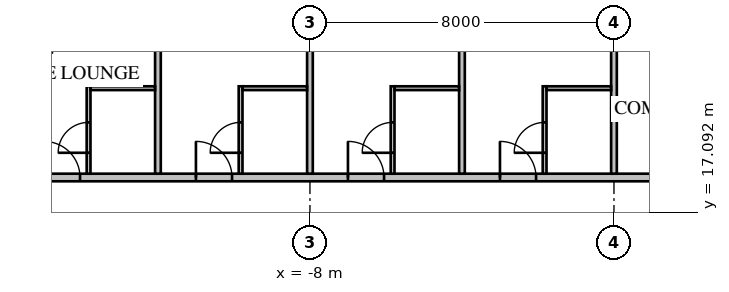
"""IFC4 building model, lengths in metres.
Left out: names, types, materials, properties, quantities, classifications, styles, units other than length and angle.
Written with IfcOpenShell. Run it as: python <this file> out.ifc"""

import sys

from ifc_helpers import new_model, si_unit, direction, frame, frame_2d, origin, place, context, subcontext, project, spatial, rectangle, extrude, element, fill, save


model = new_model("IFC4")
c1 = context("Model", 3, precision=1e-05, world=origin(), true_north=direction((0.0, 1.0)))
c2 = subcontext(c1, "Body", "Model", "MODEL_VIEW")
j1 = project(units=[si_unit("LENGTHUNIT", "METRE"), si_unit("PLANEANGLEUNIT", "RADIAN")], contexts=[c1])
p1 = place(None, origin())
s1 = spatial("IfcSite", under=j1, at=p1, CompositionType="ELEMENT")
p2 = place(p1, origin())
s2 = spatial("IfcBuilding", under=s1, at=p2, CompositionType="ELEMENT")
p3 = place(p2, frame((0.0, 0.0, 16.0)))
s3 = spatial("IfcBuildingStorey", under=s2, at=p3, CompositionType="ELEMENT", Elevation=16.0)
p4 = place(p3, frame((18.0, 18.0, 0.0), z_axis=(0.0, 0.0, 1.0), x_axis=(-1.0, 0.0, 0.0)))
e1 = element("IfcWall", 1, at=p4, inside=s3, PredefinedType="PARTITIONING", context=c2, shape_type="SweptSolid", body=[
    extrude(rectangle(XDim=36.0, YDim=0.2, at=frame_2d((18.0, 0.0))), origin(), (0.0, 0.0, 1.0), 3.65),
])
p5 = place(p4, frame((0.375, 0.0, 0.0)))
e2 = element("IfcOpeningElement", 2, at=p5, cuts=e1, PredefinedType="OPENING", context=c2, shape_type="SweptSolid", body=[
    extrude(rectangle(XDim=1.0, YDim=2.1, at=frame_2d((0.5, 1.05))), frame((0.0, 0.12, 0.0), z_axis=(0.0, -1.0, 0.0), x_axis=(1.0, 0.0, 0.0)), (0.0, 0.0, 1.0), 0.24),
])
p6 = place(p4, frame((4.05, 0.0, 0.0)))
e3 = element("IfcOpeningElement", 3, at=p6, cuts=e1, PredefinedType="OPENING", context=c2, shape_type="SweptSolid", body=[
    extrude(rectangle(XDim=0.95, YDim=2.1, at=frame_2d((0.475, 1.05))), frame((0.0, 0.12, 0.0), z_axis=(0.0, -1.0, 0.0), x_axis=(1.0, 0.0, 0.0)), (0.0, 0.0, 1.0), 0.24),
])
p7 = place(p4, frame((8.05, 0.0, 0.0)))
e4 = element("IfcOpeningElement", 4, at=p7, cuts=e1, PredefinedType="OPENING", context=c2, shape_type="SweptSolid", body=[
    extrude(rectangle(XDim=0.95, YDim=2.1, at=frame_2d((0.475, 1.05))), frame((0.0, 0.12, 0.0), z_axis=(0.0, -1.0, 0.0), x_axis=(1.0, 0.0, 0.0)), (0.0, 0.0, 1.0), 0.24),
])
p8 = place(p4, frame((20.05, 0.0, 0.0)))
e5 = element("IfcOpeningElement", 5, at=p8, cuts=e1, PredefinedType="OPENING", context=c2, shape_type="SweptSolid", body=[
    extrude(rectangle(XDim=0.95, YDim=2.1, at=frame_2d((0.475, 1.05))), frame((0.0, 0.12, 0.0), z_axis=(0.0, -1.0, 0.0), x_axis=(1.0, 0.0, 0.0)), (0.0, 0.0, 1.0), 0.24),
])
p9 = place(p4, frame((24.05, 0.0, 0.0)))
e6 = element("IfcOpeningElement", 6, at=p9, cuts=e1, PredefinedType="OPENING", context=c2, shape_type="SweptSolid", body=[
    extrude(rectangle(XDim=0.95, YDim=2.1, at=frame_2d((0.475, 1.05))), frame((0.0, 0.12, 0.0), z_axis=(0.0, -1.0, 0.0), x_axis=(1.0, 0.0, 0.0)), (0.0, 0.0, 1.0), 0.24),
])
p10 = place(p4, frame((28.05, 0.0, 0.0)))
e7 = element("IfcOpeningElement", 7, at=p10, cuts=e1, PredefinedType="OPENING", context=c2, shape_type="SweptSolid", body=[
    extrude(rectangle(XDim=0.95, YDim=2.1, at=frame_2d((0.475, 1.05))), frame((0.0, 0.12, 0.0), z_axis=(0.0, -1.0, 0.0), x_axis=(1.0, 0.0, 0.0)), (0.0, 0.0, 1.0), 0.24),
])
p11 = place(p4, frame((32.05, 0.0, 0.0)))
e8 = element("IfcOpeningElement", 8, at=p11, cuts=e1, PredefinedType="OPENING", context=c2, shape_type="SweptSolid", body=[
    extrude(rectangle(XDim=0.95, YDim=2.1, at=frame_2d((0.475, 1.05))), frame((0.0, 0.12, 0.0), z_axis=(0.0, -1.0, 0.0), x_axis=(1.0, 0.0, 0.0)), (0.0, 0.0, 1.0), 0.24),
])
p12 = place(p4, frame((34.375, 0.0, 0.0)))
e9 = element("IfcOpeningElement", 9, at=p12, cuts=e1, PredefinedType="OPENING", context=c2, shape_type="SweptSolid", body=[
    extrude(rectangle(XDim=0.95, YDim=2.1, at=frame_2d((0.475, 1.05))), frame((0.0, 0.12, 0.0), z_axis=(0.0, -1.0, 0.0), x_axis=(1.0, 0.0, 0.0)), (0.0, 0.0, 1.0), 0.24),
])
p13 = place(p4, frame((11.2, 0.0, 0.0)))
e10 = element("IfcOpeningElement", 10, at=p13, cuts=e1, PredefinedType="OPENING", context=c2, shape_type="SweptSolid", body=[
    extrude(rectangle(XDim=1.0, YDim=2.1, at=frame_2d((0.5, 1.05))), frame((0.0, 0.12, 0.0), z_axis=(0.0, -1.0, 0.0), x_axis=(1.0, 0.0, 0.0)), (0.0, 0.0, 1.0), 0.24),
])
p14 = place(p4, frame((15.2, 0.0, 0.0)))
e11 = element("IfcOpeningElement", 11, at=p14, cuts=e1, PredefinedType="OPENING", context=c2, shape_type="SweptSolid", body=[
    extrude(rectangle(XDim=1.0, YDim=2.1, at=frame_2d((0.5, 1.05))), frame((0.0, 0.12, 0.0), z_axis=(0.0, -1.0, 0.0), x_axis=(1.0, 0.0, 0.0)), (0.0, 0.0, 1.0), 0.24),
])
p15 = place(p3, frame((0.0, 18.1, 0.0), z_axis=(0.0, 0.0, 1.0), x_axis=(0.0, 1.0, 0.0)))
e12 = element("IfcWall", 12, at=p15, inside=s3, PredefinedType="PARTITIONING", context=c2, shape_type="SweptSolid", body=[
    extrude(rectangle(XDim=6.6, YDim=0.15, at=frame_2d((3.3, 0.0))), origin(), (0.0, 0.0, 1.0), 2.809),
])
for number, where, z_axis, x_axis in (
    (13, (-4.0, 18.1, 0.0), (0.0, 0.0, 1.0), (0.0, 1.0, 0.0)),
    (14, (-8.0, 18.1, 0.0), (0.0, 0.0, 1.0), (0.0, 1.0, 0.0)),
    (15, (-12.0, 18.1, 0.0), (0.0, 0.0, 1.0), (0.0, 1.0, 0.0)),
):
    element("IfcWall", number, at=place(p3, frame(where, z_axis=z_axis, x_axis=x_axis)), inside=s3, PredefinedType="PARTITIONING", context=c2, shape_type="SweptSolid", body=[
        extrude(rectangle(XDim=6.6, YDim=0.15, at=frame_2d((3.3, 0.0))), origin(), (0.0, 0.0, 1.0), 3.65),
    ])
p16 = place(p3, frame((-1.825, 18.1, 0.0), z_axis=(0.0, 0.0, 1.0), x_axis=(0.0, 1.0, 0.0)))
e16 = element("IfcWall", 16, at=p16, inside=s3, PredefinedType="PARTITIONING", context=c2, shape_type="SweptSolid", body=[
    extrude(rectangle(XDim=2.3, YDim=0.1, at=frame_2d((1.15, 0.0))), origin(), (0.0, 0.0, 1.0), 3.65),
])
p17 = place(p16, frame((0.55, 0.0, 0.0)))
e17 = element("IfcOpeningElement", 17, at=p17, cuts=e16, PredefinedType="OPENING", context=c2, shape_type="SweptSolid", body=[
    extrude(rectangle(XDim=0.8, YDim=2.1, at=frame_2d((0.4, 1.05))), frame((0.0, 0.07, 0.0), z_axis=(0.0, -1.0, 0.0), x_axis=(1.0, 0.0, 0.0)), (0.0, 0.0, 1.0), 0.14),
])
p18 = place(p3, frame((-0.075, 20.35, 0.0), z_axis=(0.0, 0.0, 1.0), x_axis=(-1.0, 0.0, 0.0)))
e18 = element("IfcWall", 18, at=p18, inside=s3, PredefinedType="PARTITIONING", context=c2, shape_type="SweptSolid", body=[
    extrude(rectangle(XDim=1.7, YDim=0.1, at=frame_2d((0.85, 0.0))), origin(), (0.0, 0.0, 1.0), 3.65),
])
p19 = place(p3, frame((-5.825, 18.1, 0.0), z_axis=(0.0, 0.0, 1.0), x_axis=(0.0, 1.0, 0.0)))
e19 = element("IfcWall", 19, at=p19, inside=s3, PredefinedType="PARTITIONING", context=c2, shape_type="SweptSolid", body=[
    extrude(rectangle(XDim=2.3, YDim=0.1, at=frame_2d((1.15, 0.0))), origin(), (0.0, 0.0, 1.0), 3.65),
])
p20 = place(p19, frame((0.55, 0.0, 0.0)))
e20 = element("IfcOpeningElement", 20, at=p20, cuts=e19, PredefinedType="OPENING", context=c2, shape_type="SweptSolid", body=[
    extrude(rectangle(XDim=0.8, YDim=2.1, at=frame_2d((0.4, 1.05))), frame((0.0, 0.07, 0.0), z_axis=(0.0, -1.0, 0.0), x_axis=(1.0, 0.0, 0.0)), (0.0, 0.0, 1.0), 0.14),
])
p21 = place(p3, frame((-4.075, 20.35, 0.0), z_axis=(0.0, 0.0, 1.0), x_axis=(-1.0, 0.0, 0.0)))
e21 = element("IfcWall", 21, at=p21, inside=s3, PredefinedType="PARTITIONING", context=c2, shape_type="SweptSolid", body=[
    extrude(rectangle(XDim=1.7, YDim=0.1, at=frame_2d((0.85, 0.0))), origin(), (0.0, 0.0, 1.0), 3.65),
])
p22 = place(p3, frame((-9.825, 18.1, 0.0), z_axis=(0.0, 0.0, 1.0), x_axis=(0.0, 1.0, 0.0)))
e22 = element("IfcWall", 22, at=p22, inside=s3, PredefinedType="PARTITIONING", context=c2, shape_type="SweptSolid", body=[
    extrude(rectangle(XDim=2.3, YDim=0.1, at=frame_2d((1.15, 0.0))), origin(), (0.0, 0.0, 1.0), 3.65),
])
p23 = place(p22, frame((0.55, 0.0, 0.0)))
e23 = element("IfcOpeningElement", 23, at=p23, cuts=e22, PredefinedType="OPENING", context=c2, shape_type="SweptSolid", body=[
    extrude(rectangle(XDim=0.8, YDim=2.1, at=frame_2d((0.4, 1.05))), frame((0.0, 0.07, 0.0), z_axis=(0.0, -1.0, 0.0), x_axis=(1.0, 0.0, 0.0)), (0.0, 0.0, 1.0), 0.14),
])
p24 = place(p3, frame((-8.075, 20.35, 0.0), z_axis=(0.0, 0.0, 1.0), x_axis=(-1.0, 0.0, 0.0)))
e24 = element("IfcWall", 24, at=p24, inside=s3, PredefinedType="PARTITIONING", context=c2, shape_type="SweptSolid", body=[
    extrude(rectangle(XDim=1.7, YDim=0.1, at=frame_2d((0.85, 0.0))), origin(), (0.0, 0.0, 1.0), 3.65),
])
p25 = place(p3, frame((-13.825, 18.1, 0.0), z_axis=(0.0, 0.0, 1.0), x_axis=(0.0, 1.0, 0.0)))
e25 = element("IfcWall", 25, at=p25, inside=s3, PredefinedType="PARTITIONING", context=c2, shape_type="SweptSolid", body=[
    extrude(rectangle(XDim=2.3, YDim=0.1, at=frame_2d((1.15, 0.0))), origin(), (0.0, 0.0, 1.0), 3.65),
])
p26 = place(p25, frame((0.55, 0.0, 0.0)))
e26 = element("IfcOpeningElement", 26, at=p26, cuts=e25, PredefinedType="OPENING", context=c2, shape_type="SweptSolid", body=[
    extrude(rectangle(XDim=0.8, YDim=2.1, at=frame_2d((0.4, 1.05))), frame((0.0, 0.07, 0.0), z_axis=(0.0, -1.0, 0.0), x_axis=(1.0, 0.0, 0.0)), (0.0, 0.0, 1.0), 0.14),
])
p27 = place(p3, frame((-12.075, 20.35, 0.0), z_axis=(0.0, 0.0, 1.0), x_axis=(-1.0, 0.0, 0.0)))
e27 = element("IfcWall", 27, at=p27, inside=s3, PredefinedType="PARTITIONING", context=c2, shape_type="SweptSolid", body=[
    extrude(rectangle(XDim=1.7, YDim=0.1, at=frame_2d((0.85, 0.0))), origin(), (0.0, 0.0, 1.0), 3.65),
])
p28 = place(p8, origin())
e28 = element("IfcDoor", 28, at=p28, inside=s3, OperationType="SINGLE_SWING_RIGHT", PredefinedType="DOOR", context=c2, shape_type="SweptSolid", body=[
    extrude(rectangle(XDim=0.95, YDim=2.1, at=frame_2d((0.475, 1.05))), frame((0.0, 0.025, 0.0), z_axis=(0.0, -1.0, 0.0), x_axis=(1.0, 0.0, 0.0)), (0.0, 0.0, 1.0), 0.05),
])
fill(e5, e28)
p29 = place(p17, origin())
e29 = element("IfcDoor", 29, at=p29, inside=s3, OperationType="SINGLE_SWING_LEFT", PredefinedType="DOOR", context=c2, shape_type="SweptSolid", body=[
    extrude(rectangle(XDim=0.8, YDim=2.1, at=frame_2d((0.4, 1.05))), frame((0.0, 0.025, 0.0), z_axis=(0.0, -1.0, 0.0), x_axis=(1.0, 0.0, 0.0)), (0.0, 0.0, 1.0), 0.05),
])
fill(e17, e29)
p30 = place(p9, origin())
e30 = element("IfcDoor", 30, at=p30, inside=s3, OperationType="SINGLE_SWING_RIGHT", PredefinedType="DOOR", context=c2, shape_type="SweptSolid", body=[
    extrude(rectangle(XDim=0.95, YDim=2.1, at=frame_2d((0.475, 1.05))), frame((0.0, 0.025, 0.0), z_axis=(0.0, -1.0, 0.0), x_axis=(1.0, 0.0, 0.0)), (0.0, 0.0, 1.0), 0.05),
])
fill(e6, e30)
p31 = place(p20, origin())
e31 = element("IfcDoor", 31, at=p31, inside=s3, OperationType="SINGLE_SWING_LEFT", PredefinedType="DOOR", context=c2, shape_type="SweptSolid", body=[
    extrude(rectangle(XDim=0.8, YDim=2.1, at=frame_2d((0.4, 1.05))), frame((0.0, 0.025, 0.0), z_axis=(0.0, -1.0, 0.0), x_axis=(1.0, 0.0, 0.0)), (0.0, 0.0, 1.0), 0.05),
])
fill(e20, e31)
p32 = place(p10, origin())
e32 = element("IfcDoor", 32, at=p32, inside=s3, OperationType="SINGLE_SWING_RIGHT", PredefinedType="DOOR", context=c2, shape_type="SweptSolid", body=[
    extrude(rectangle(XDim=0.95, YDim=2.1, at=frame_2d((0.475, 1.05))), frame((0.0, 0.025, 0.0), z_axis=(0.0, -1.0, 0.0), x_axis=(1.0, 0.0, 0.0)), (0.0, 0.0, 1.0), 0.05),
])
fill(e7, e32)
p33 = place(p23, origin())
e33 = element("IfcDoor", 33, at=p33, inside=s3, OperationType="SINGLE_SWING_LEFT", PredefinedType="DOOR", context=c2, shape_type="SweptSolid", body=[
    extrude(rectangle(XDim=0.8, YDim=2.1, at=frame_2d((0.4, 1.05))), frame((0.0, 0.025, 0.0), z_axis=(0.0, -1.0, 0.0), x_axis=(1.0, 0.0, 0.0)), (0.0, 0.0, 1.0), 0.05),
])
fill(e23, e33)
p34 = place(p11, origin())
e34 = element("IfcDoor", 34, at=p34, inside=s3, OperationType="SINGLE_SWING_RIGHT", PredefinedType="DOOR", context=c2, shape_type="SweptSolid", body=[
    extrude(rectangle(XDim=0.95, YDim=2.1, at=frame_2d((0.475, 1.05))), frame((0.0, 0.025, 0.0), z_axis=(0.0, -1.0, 0.0), x_axis=(1.0, 0.0, 0.0)), (0.0, 0.0, 1.0), 0.05),
])
fill(e8, e34)
p35 = place(p26, origin())
e35 = element("IfcDoor", 35, at=p35, inside=s3, OperationType="SINGLE_SWING_LEFT", PredefinedType="DOOR", context=c2, shape_type="SweptSolid", body=[
    extrude(rectangle(XDim=0.8, YDim=2.1, at=frame_2d((0.4, 1.05))), frame((0.0, 0.025, 0.0), z_axis=(0.0, -1.0, 0.0), x_axis=(1.0, 0.0, 0.0)), (0.0, 0.0, 1.0), 0.05),
])
fill(e26, e35)
save(model, sys.argv[1])
